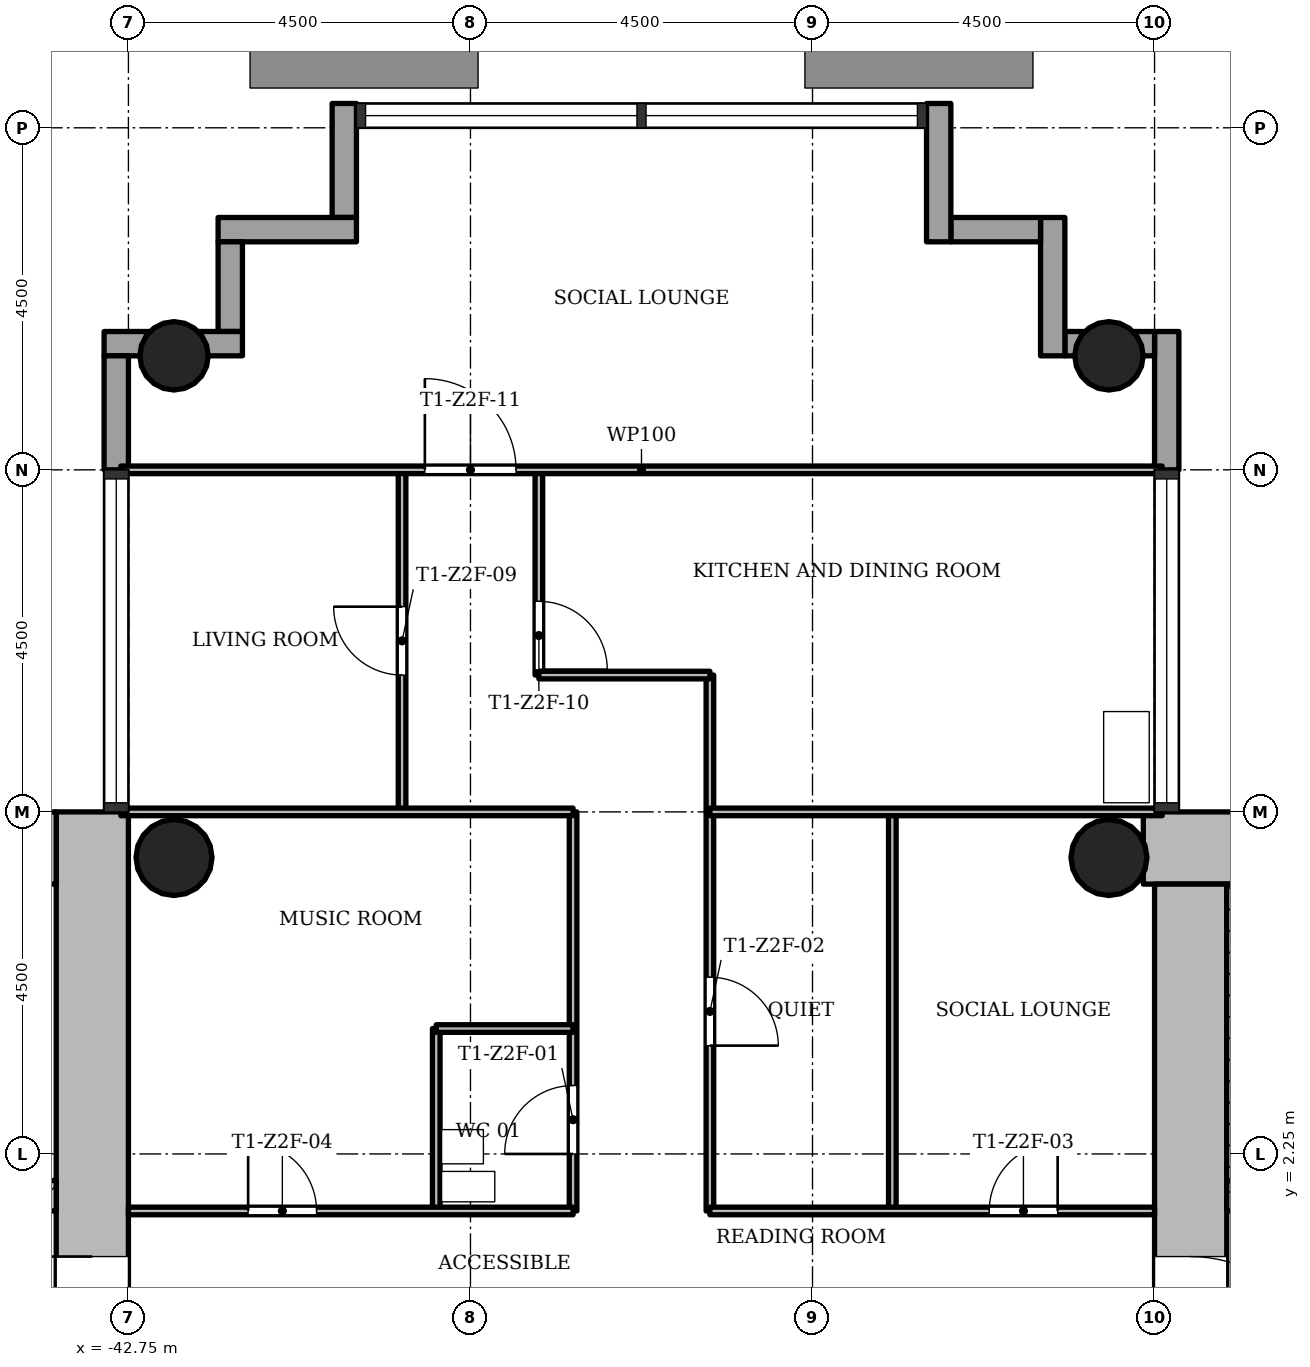
"""IFC4 building model, lengths in metres.
Left out: names, types, materials, properties, quantities, classifications, styles, units other than length and angle.
Written with IfcOpenShell. Run it as: python <this file> out.ifc"""

import sys

from ifc_helpers import new_model, si_unit, direction, frame, frame_2d, origin, origin_2d, place, context, subcontext, project, spatial, rectangle, hollow_circle, extrude, element, fill, save


model = new_model("IFC4")
c1 = context("Model", 3, precision=1e-05, world=origin(), true_north=direction((0.0, 1.0)))
c2 = subcontext(c1, "Body", "Model", "MODEL_VIEW")
j1 = project(units=[si_unit("LENGTHUNIT", "METRE"), si_unit("PLANEANGLEUNIT", "RADIAN")], contexts=[c1])
p1 = place(None, origin())
s1 = spatial("IfcSite", under=j1, at=p1, CompositionType="ELEMENT")
p2 = place(p1, origin())
s2 = spatial("IfcBuilding", under=s1, at=p2, CompositionType="ELEMENT")
p3 = place(p2, frame((0.0, 0.0, 107.2)))
s3 = spatial("IfcBuildingStorey", under=s2, at=p3, CompositionType="ELEMENT", Elevation=107.2)
p4 = place(p3, frame((-20.702, 6.275, 0.0), z_axis=(0.0, 0.0, 1.0), x_axis=(-1.0, 0.0, 0.0)))
e1 = element("IfcWall", 1, at=p4, inside=s3, PredefinedType="SHEAR", context=c2, shape_type="SweptSolid", body=[
    extrude(rectangle(XDim=8.696, YDim=0.95, at=frame_2d((4.348, 0.0))), origin(), (0.0, 0.0, 1.0), 3.4),
])
p5 = place(p3, frame((-28.775, 5.8, 0.0), z_axis=(0.0, 0.0, 1.0), x_axis=(0.0, -1.0, 0.0)))
e2 = element("IfcWall", 2, at=p5, inside=s3, PredefinedType="SHEAR", context=c2, shape_type="SweptSolid", body=[
    extrude(rectangle(XDim=12.55, YDim=0.95, at=frame_2d((6.275, 0.0))), origin(), (0.0, 0.0, 1.0), 3.4),
])
p6 = place(p5, frame((4.9, 0.0, 0.0)))
e3 = element("IfcOpeningElement", 3, at=p6, cuts=e2, PredefinedType="OPENING", context=c2, shape_type="SweptSolid", body=[
    extrude(rectangle(XDim=1.8, YDim=2.1, at=frame_2d((0.9, 1.05))), frame((0.0, 0.485, 0.0), z_axis=(0.0, -1.0, 0.0), x_axis=(1.0, 0.0, 0.0)), (0.0, 0.0, 1.0), 0.97),
])
p7 = place(p3, frame((-28.3, 1.7, 0.0), z_axis=(0.0, 0.0, 1.0), x_axis=(1.0, 0.0, 0.0)))
e4 = element("IfcWall", 4, at=p7, inside=s3, PredefinedType="SHEAR", context=c2, shape_type="SweptSolid", body=[
    extrude(rectangle(XDim=7.1, YDim=0.4, at=frame_2d((3.55, 0.0))), origin(), (0.0, 0.0, 1.0), 3.4),
])
p8 = place(p7, frame((0.7, 0.0, 0.0)))
e5 = element("IfcOpeningElement", 5, at=p8, cuts=e4, PredefinedType="OPENING", context=c2, shape_type="SweptSolid", body=[
    extrude(rectangle(XDim=0.9, YDim=2.1, at=frame_2d((0.45, 1.05))), frame((0.0, 0.21, 0.0), z_axis=(0.0, -1.0, 0.0), x_axis=(1.0, 0.0, 0.0)), (0.0, 0.0, 1.0), 0.42),
])
p9 = place(p3, frame((-43.225, -5.8, 0.0), z_axis=(0.0, 0.0, 1.0), x_axis=(0.0, 1.0, 0.0)))
e6 = element("IfcWall", 6, at=p9, inside=s3, PredefinedType="SHEAR", context=c2, shape_type="SweptSolid", body=[
    extrude(rectangle(XDim=12.55, YDim=0.95, at=frame_2d((6.275, 0.0))), origin(), (0.0, 0.0, 1.0), 3.4),
])
p10 = place(p9, frame((4.9, 0.0, 0.0)))
e7 = element("IfcOpeningElement", 7, at=p10, cuts=e6, PredefinedType="OPENING", context=c2, shape_type="SweptSolid", body=[
    extrude(rectangle(XDim=1.8, YDim=2.1, at=frame_2d((0.9, 1.05))), frame((0.0, 0.485, 0.0), z_axis=(0.0, -1.0, 0.0), x_axis=(1.0, 0.0, 0.0)), (0.0, 0.0, 1.0), 0.97),
])
p11 = place(p3, frame((-43.7, 6.275, 0.0), z_axis=(0.0, 0.0, 1.0), x_axis=(-1.0, 0.0, 0.0)))
e8 = element("IfcWall", 8, at=p11, inside=s3, PredefinedType="SHEAR", context=c2, shape_type="SweptSolid", body=[
    extrude(rectangle(XDim=8.05, YDim=0.95, at=frame_2d((4.025, 0.0))), origin(), (0.0, 0.0, 1.0), 3.4),
])
p12 = place(p3, frame((-50.8, 1.7, 0.0), z_axis=(0.0, 0.0, 1.0), x_axis=(1.0, 0.0, 0.0)))
e9 = element("IfcWall", 9, at=p12, inside=s3, PredefinedType="SHEAR", context=c2, shape_type="SweptSolid", body=[
    extrude(rectangle(XDim=7.1, YDim=0.4, at=frame_2d((3.55, 0.0))), origin(), (0.0, 0.0, 1.0), 3.4),
])
p13 = place(p12, frame((5.2, 0.0, 0.0)))
e10 = element("IfcOpeningElement", 10, at=p13, cuts=e9, PredefinedType="OPENING", context=c2, shape_type="SweptSolid", body=[
    extrude(rectangle(XDim=1.1, YDim=2.1, at=frame_2d((0.55, 1.05))), frame((0.0, 0.21, 0.0), z_axis=(0.0, -1.0, 0.0), x_axis=(1.0, 0.0, 0.0)), (0.0, 0.0, 1.0), 0.42),
])
for number, where, z_axis, x_axis in (
    (11, (-29.85, 12.75, 0.0), (0.0, 0.0, 1.0), (1.0, 0.0, 0.0)),
    (12, (-42.15, 12.75, 0.0), (0.0, 0.0, 1.0), (1.0, 0.0, 0.0)),
):
    element("IfcColumn", number, at=place(p3, frame(where, z_axis=z_axis, x_axis=x_axis)), inside=s3, PredefinedType="COLUMN", context=c2, shape_type="SweptSolid", body=[
        extrude(hollow_circle(Radius=0.45, WallThickness=0.032, at=origin_2d()), origin(), (0.0, 0.0, 1.0), 3.4),
    ])
for number, where, z_axis, x_axis in (
    (13, (-29.85, 6.15, 0.0), (0.0, 0.0, 1.0), (1.0, 0.0, 0.0)),
    (14, (-42.15, 6.15, 0.0), (0.0, 0.0, 1.0), (1.0, 0.0, 0.0)),
):
    element("IfcColumn", number, at=place(p3, frame(where, z_axis=z_axis, x_axis=x_axis)), inside=s3, PredefinedType="COLUMN", context=c2, shape_type="SweptSolid", body=[
        extrude(hollow_circle(Radius=0.5, WallThickness=0.036, at=origin_2d()), origin(), (0.0, 0.0, 1.0), 3.4),
    ])
p14 = place(p3, frame((-29.09, 11.25, -0.3), z_axis=(0.0, 0.0, 1.0), x_axis=(0.0, 1.0, 0.0)))
e15 = element("IfcWall", 15, at=p14, inside=s3, PredefinedType="STANDARD", context=c2, shape_type="SweptSolid", body=[
    extrude(rectangle(XDim=1.82, YDim=0.32, at=frame_2d((0.91, 0.0))), origin(), (0.0, 0.0, 1.0), 3.4),
])
p15 = place(p3, frame((-29.25, 12.91, -0.3), z_axis=(0.0, 0.0, 1.0), x_axis=(-1.0, 0.0, 0.0)))
e16 = element("IfcWall", 16, at=p15, inside=s3, PredefinedType="STANDARD", context=c2, shape_type="SweptSolid", body=[
    extrude(rectangle(XDim=1.18, YDim=0.32, at=frame_2d((0.59, 0.0))), origin(), (0.0, 0.0, 1.0), 3.4),
])
p16 = place(p3, frame((-30.59, 12.75, -0.3), z_axis=(0.0, 0.0, 1.0), x_axis=(0.0, 1.0, 0.0)))
e17 = element("IfcWall", 17, at=p16, inside=s3, PredefinedType="STANDARD", context=c2, shape_type="SweptSolid", body=[
    extrude(rectangle(XDim=1.82, YDim=0.32, at=frame_2d((0.91, 0.0))), origin(), (0.0, 0.0, 1.0), 3.4),
])
p17 = place(p3, frame((-30.75, 14.41, -0.3), z_axis=(0.0, 0.0, 1.0), x_axis=(-1.0, 0.0, 0.0)))
e18 = element("IfcWall", 18, at=p17, inside=s3, PredefinedType="STANDARD", context=c2, shape_type="SweptSolid", body=[
    extrude(rectangle(XDim=1.18, YDim=0.32, at=frame_2d((0.59, 0.0))), origin(), (0.0, 0.0, 1.0), 3.4),
])
p18 = place(p3, frame((-32.09, 14.25, -0.3), z_axis=(0.0, 0.0, 1.0), x_axis=(0.0, 1.0, 0.0)))
e19 = element("IfcWall", 19, at=p18, inside=s3, PredefinedType="STANDARD", context=c2, shape_type="SweptSolid", body=[
    extrude(rectangle(XDim=1.82, YDim=0.32, at=frame_2d((0.91, 0.0))), origin(), (0.0, 0.0, 1.0), 3.4),
])
p19 = place(p3, frame((-39.91, 16.07, -0.3), z_axis=(0.0, 0.0, 1.0), x_axis=(0.0, -1.0, 0.0)))
e20 = element("IfcWall", 20, at=p19, inside=s3, PredefinedType="STANDARD", context=c2, shape_type="SweptSolid", body=[
    extrude(rectangle(XDim=1.5, YDim=0.32, at=frame_2d((0.75, 0.0))), origin(), (0.0, 0.0, 1.0), 3.4),
])
p20 = place(p3, frame((-39.75, 14.41, -0.3), z_axis=(0.0, 0.0, 1.0), x_axis=(-1.0, 0.0, 0.0)))
e21 = element("IfcWall", 21, at=p20, inside=s3, PredefinedType="STANDARD", context=c2, shape_type="SweptSolid", body=[
    extrude(rectangle(XDim=1.82, YDim=0.32, at=frame_2d((0.91, 0.0))), origin(), (0.0, 0.0, 1.0), 3.4),
])
p21 = place(p3, frame((-41.41, 14.25, -0.3), z_axis=(0.0, 0.0, 1.0), x_axis=(0.0, -1.0, 0.0)))
e22 = element("IfcWall", 22, at=p21, inside=s3, PredefinedType="STANDARD", context=c2, shape_type="SweptSolid", body=[
    extrude(rectangle(XDim=1.18, YDim=0.32, at=frame_2d((0.59, 0.0))), origin(), (0.0, 0.0, 1.0), 3.4),
])
p22 = place(p3, frame((-41.25, 12.91, -0.3), z_axis=(0.0, 0.0, 1.0), x_axis=(-1.0, 0.0, 0.0)))
e23 = element("IfcWall", 23, at=p22, inside=s3, PredefinedType="STANDARD", context=c2, shape_type="SweptSolid", body=[
    extrude(rectangle(XDim=1.82, YDim=0.32, at=frame_2d((0.91, 0.0))), origin(), (0.0, 0.0, 1.0), 3.4),
])
p23 = place(p3, frame((-42.91, 12.75, -0.3), z_axis=(0.0, 0.0, 1.0), x_axis=(0.0, -1.0, 0.0)))
e24 = element("IfcWall", 24, at=p23, inside=s3, PredefinedType="STANDARD", context=c2, shape_type="SweptSolid", body=[
    extrude(rectangle(XDim=1.5, YDim=0.32, at=frame_2d((0.75, 0.0))), origin(), (0.0, 0.0, 1.0), 3.4),
])
p24 = place(p3, frame((-39.15, 6.75, 0.0), z_axis=(0.0, 0.0, 1.0), x_axis=(0.0, 1.0, 0.0)))
e25 = element("IfcWall", 25, at=p24, inside=s3, PredefinedType="PARTITIONING", context=c2, shape_type="SweptSolid", body=[
    extrude(rectangle(XDim=4.5, YDim=0.1, at=frame_2d((2.25, 0.0))), origin(), (0.0, 0.0, 1.0), 3.0),
])
p25 = place(p24, frame((1.8, 0.0, 0.0)))
e26 = element("IfcOpeningElement", 26, at=p25, cuts=e25, PredefinedType="OPENING", context=c2, shape_type="SweptSolid", body=[
    extrude(rectangle(XDim=0.9, YDim=2.1, at=frame_2d((0.45, 1.05))), frame((0.0, 0.06, 0.0), z_axis=(0.0, -1.0, 0.0), x_axis=(1.0, 0.0, 0.0)), (0.0, 0.0, 1.0), 0.12),
])
p26 = place(p3, frame((-38.7, 1.5, 0.0), z_axis=(0.0, 0.0, 1.0), x_axis=(0.0, 1.0, 0.0)))
e27 = element("IfcWall", 27, at=p26, inside=s3, PredefinedType="PARTITIONING", context=c2, shape_type="SweptSolid", body=[
    extrude(rectangle(XDim=2.4, YDim=0.1, at=frame_2d((1.2, 0.0))), origin(), (0.0, 0.0, 1.0), 3.0),
])
p27 = place(p3, frame((-37.35, 8.55, 0.0), z_axis=(0.0, 0.0, 1.0), x_axis=(0.0, 1.0, 0.0)))
e28 = element("IfcWall", 28, at=p27, inside=s3, PredefinedType="PARTITIONING", context=c2, shape_type="SweptSolid", body=[
    extrude(rectangle(XDim=2.7, YDim=0.1, at=frame_2d((1.35, 0.0))), origin(), (0.0, 0.0, 1.0), 3.0),
])
p28 = place(p27, frame((0.07, 0.0, 0.0)))
e29 = element("IfcOpeningElement", 29, at=p28, cuts=e28, PredefinedType="OPENING", context=c2, shape_type="SweptSolid", body=[
    extrude(rectangle(XDim=0.9, YDim=2.1, at=frame_2d((0.45, 1.05))), frame((0.0, 0.06, 0.0), z_axis=(0.0, -1.0, 0.0), x_axis=(1.0, 0.0, 0.0)), (0.0, 0.0, 1.0), 0.12),
])
p29 = place(p3, frame((-36.9, 1.5, 0.0), z_axis=(0.0, 0.0, 1.0), x_axis=(0.0, 1.0, 0.0)))
e30 = element("IfcWall", 30, at=p29, inside=s3, PredefinedType="PARTITIONING", context=c2, shape_type="SweptSolid", body=[
    extrude(rectangle(XDim=5.25, YDim=0.1, at=frame_2d((2.625, 0.0))), origin(), (0.0, 0.0, 1.0), 3.0),
])
p30 = place(p29, frame((0.75, 0.0, 0.0)))
e31 = element("IfcOpeningElement", 31, at=p30, cuts=e30, PredefinedType="OPENING", context=c2, shape_type="SweptSolid", body=[
    extrude(rectangle(XDim=0.9, YDim=2.1, at=frame_2d((0.45, 1.05))), frame((0.0, 0.06, 0.0), z_axis=(0.0, -1.0, 0.0), x_axis=(1.0, 0.0, 0.0)), (0.0, 0.0, 1.0), 0.12),
])
p31 = place(p3, frame((-35.1, 1.5, 0.0), z_axis=(0.0, 0.0, 1.0), x_axis=(0.0, 1.0, 0.0)))
e32 = element("IfcWall", 32, at=p31, inside=s3, PredefinedType="PARTITIONING", context=c2, shape_type="SweptSolid", body=[
    extrude(rectangle(XDim=7.05, YDim=0.1, at=frame_2d((3.525, 0.0))), origin(), (0.0, 0.0, 1.0), 3.0),
])
p32 = place(p31, frame((2.175, 0.0, 0.0)))
e33 = element("IfcOpeningElement", 33, at=p32, cuts=e32, PredefinedType="OPENING", context=c2, shape_type="SweptSolid", body=[
    extrude(rectangle(XDim=0.9, YDim=2.1, at=frame_2d((0.45, 1.05))), frame((0.0, 0.06, 0.0), z_axis=(0.0, -1.0, 0.0), x_axis=(1.0, 0.0, 0.0)), (0.0, 0.0, 1.0), 0.12),
])
p33 = place(p3, frame((-32.7, 1.5, 0.0), z_axis=(0.0, 0.0, 1.0), x_axis=(0.0, 1.0, 0.0)))
e34 = element("IfcWall", 34, at=p33, inside=s3, PredefinedType="PARTITIONING", context=c2, shape_type="SweptSolid", body=[
    extrude(rectangle(XDim=5.25, YDim=0.1, at=frame_2d((2.625, 0.0))), origin(), (0.0, 0.0, 1.0), 3.0),
])
p34 = place(p3, frame((-42.75, 1.5, 0.0), z_axis=(0.0, 0.0, 1.0), x_axis=(1.0, 0.0, 0.0)))
e35 = element("IfcWall", 35, at=p34, inside=s3, PredefinedType="PARTITIONING", context=c2, shape_type="SweptSolid", body=[
    extrude(rectangle(XDim=5.85, YDim=0.1, at=frame_2d((2.925, 0.0))), origin(), (0.0, 0.0, 1.0), 3.0),
])
p35 = place(p34, frame((1.575, 0.0, 0.0)))
e36 = element("IfcOpeningElement", 36, at=p35, cuts=e35, PredefinedType="OPENING", context=c2, shape_type="SweptSolid", body=[
    extrude(rectangle(XDim=0.9, YDim=2.1, at=frame_2d((0.45, 1.05))), frame((0.0, 0.06, 0.0), z_axis=(0.0, -1.0, 0.0), x_axis=(1.0, 0.0, 0.0)), (0.0, 0.0, 1.0), 0.12),
])
p36 = place(p3, frame((-35.1, 1.5, 0.0), z_axis=(0.0, 0.0, 1.0), x_axis=(1.0, 0.0, 0.0)))
e37 = element("IfcWall", 37, at=p36, inside=s3, PredefinedType="PARTITIONING", context=c2, shape_type="SweptSolid", body=[
    extrude(rectangle(XDim=5.85, YDim=0.1, at=frame_2d((2.925, 0.0))), origin(), (0.0, 0.0, 1.0), 3.0),
])
p37 = place(p36, frame((3.675, 0.0, 0.0)))
e38 = element("IfcOpeningElement", 38, at=p37, cuts=e37, PredefinedType="OPENING", context=c2, shape_type="SweptSolid", body=[
    extrude(rectangle(XDim=0.9, YDim=2.1, at=frame_2d((0.45, 1.05))), frame((0.0, 0.06, 0.0), z_axis=(0.0, -1.0, 0.0), x_axis=(1.0, 0.0, 0.0)), (0.0, 0.0, 1.0), 0.12),
])
p38 = place(p3, frame((-38.7, 3.9, 0.0), z_axis=(0.0, 0.0, 1.0), x_axis=(1.0, 0.0, 0.0)))
e39 = element("IfcWall", 39, at=p38, inside=s3, PredefinedType="PARTITIONING", context=c2, shape_type="SweptSolid", body=[
    extrude(rectangle(XDim=1.8, YDim=0.1, at=frame_2d((0.9, 0.0))), origin(), (0.0, 0.0, 1.0), 3.0),
])
for number, where, z_axis, x_axis in (
    (40, (-42.85, 6.75, 0.0), (0.0, 0.0, 1.0), (1.0, 0.0, 0.0)),
    (41, (-35.1, 6.75, 0.0), (0.0, 0.0, 1.0), (1.0, 0.0, 0.0)),
):
    element("IfcWall", number, at=place(p3, frame(where, z_axis=z_axis, x_axis=x_axis)), inside=s3, PredefinedType="PARTITIONING", context=c2, shape_type="SweptSolid", body=[
        extrude(rectangle(XDim=5.95, YDim=0.1, at=frame_2d((2.975, 0.0))), origin(), (0.0, 0.0, 1.0), 3.0),
    ])
p39 = place(p3, frame((-37.35, 8.55, 0.0), z_axis=(0.0, 0.0, 1.0), x_axis=(1.0, 0.0, 0.0)))
e42 = element("IfcWall", 42, at=p39, inside=s3, PredefinedType="PARTITIONING", context=c2, shape_type="SweptSolid", body=[
    extrude(rectangle(XDim=2.25, YDim=0.1, at=frame_2d((1.125, 0.0))), origin(), (0.0, 0.0, 1.0), 3.0),
])
p40 = place(p3, frame((-42.85, 11.25, 0.0), z_axis=(0.0, 0.0, 1.0), x_axis=(1.0, 0.0, 0.0)))
e43 = element("IfcWall", 43, at=p40, inside=s3, PredefinedType="PARTITIONING", context=c2, shape_type="SweptSolid", body=[
    extrude(rectangle(XDim=13.7, YDim=0.1, at=frame_2d((6.85, 0.0))), origin(), (0.0, 0.0, 1.0), 3.0),
])
p41 = place(p40, frame((4.0, 0.0, 0.0)))
e44 = element("IfcOpeningElement", 44, at=p41, cuts=e43, PredefinedType="OPENING", context=c2, shape_type="SweptSolid", body=[
    extrude(rectangle(XDim=1.2, YDim=2.1, at=frame_2d((0.6, 1.05))), frame((0.0, 0.06, 0.0), z_axis=(0.0, -1.0, 0.0), x_axis=(1.0, 0.0, 0.0)), (0.0, 0.0, 1.0), 0.12),
])
p42 = place(p3, frame((-28.175, 1.9, 0.0), z_axis=(0.0, 0.0, 1.0), x_axis=(0.0, 1.0, 0.0)))
e45 = element("IfcWall", 45, at=p42, inside=s3, PredefinedType="SHEAR", context=c2, shape_type="SweptSolid", body=[
    extrude(rectangle(XDim=3.9, YDim=0.25, at=frame_2d((1.95, 0.0))), origin(), (0.0, 0.0, 1.0), 3.4),
])
p43 = place(p30, origin())
e46 = element("IfcDoor", 46, at=p43, inside=s3, OperationType="SINGLE_SWING_RIGHT", PredefinedType="DOOR", context=c2, shape_type="SweptSolid", body=[
    extrude(rectangle(XDim=0.9, YDim=2.1, at=frame_2d((0.45, 1.05))), frame((0.0, 0.025, 0.0), z_axis=(0.0, -1.0, 0.0), x_axis=(1.0, 0.0, 0.0)), (0.0, 0.0, 1.0), 0.05),
])
fill(e31, e46)
p44 = place(p32, origin())
e47 = element("IfcDoor", 47, at=p44, inside=s3, OperationType="SINGLE_SWING_LEFT", PredefinedType="DOOR", context=c2, shape_type="SweptSolid", body=[
    extrude(rectangle(XDim=0.9, YDim=2.1, at=frame_2d((0.45, 1.05))), frame((0.0, 0.025, 0.0), z_axis=(0.0, -1.0, 0.0), x_axis=(1.0, 0.0, 0.0)), (0.0, 0.0, 1.0), 0.05),
])
fill(e33, e47)
p45 = place(p37, origin())
e48 = element("IfcDoor", 48, at=p45, inside=s3, OperationType="SINGLE_SWING_LEFT", PredefinedType="DOOR", context=c2, shape_type="SweptSolid", body=[
    extrude(rectangle(XDim=0.9, YDim=2.1, at=frame_2d((0.45, 1.05))), frame((0.0, 0.025, 0.0), z_axis=(0.0, -1.0, 0.0), x_axis=(1.0, 0.0, 0.0)), (0.0, 0.0, 1.0), 0.05),
])
fill(e38, e48)
p46 = place(p35, origin())
e49 = element("IfcDoor", 49, at=p46, inside=s3, OperationType="SINGLE_SWING_RIGHT", PredefinedType="DOOR", context=c2, shape_type="SweptSolid", body=[
    extrude(rectangle(XDim=0.9, YDim=2.1, at=frame_2d((0.45, 1.05))), frame((0.0, 0.025, 0.0), z_axis=(0.0, -1.0, 0.0), x_axis=(1.0, 0.0, 0.0)), (0.0, 0.0, 1.0), 0.05),
])
fill(e36, e49)
p47 = place(p25, origin())
e50 = element("IfcDoor", 50, at=p47, inside=s3, OperationType="SINGLE_SWING_LEFT", PredefinedType="DOOR", context=c2, shape_type="SweptSolid", body=[
    extrude(rectangle(XDim=0.9, YDim=2.1, at=frame_2d((0.45, 1.05))), frame((0.0, 0.025, 0.0), z_axis=(0.0, -1.0, 0.0), x_axis=(1.0, 0.0, 0.0)), (0.0, 0.0, 1.0), 0.05),
])
fill(e26, e50)
p48 = place(p28, origin())
e51 = element("IfcDoor", 51, at=p48, inside=s3, OperationType="SINGLE_SWING_LEFT", PredefinedType="DOOR", context=c2, shape_type="SweptSolid", body=[
    extrude(rectangle(XDim=0.9, YDim=2.1, at=frame_2d((0.45, 1.05))), frame((0.0, 0.025, 0.0), z_axis=(0.0, -1.0, 0.0), x_axis=(1.0, 0.0, 0.0)), (0.0, 0.0, 1.0), 0.05),
])
fill(e29, e51)
p49 = place(p41, origin())
e52 = element("IfcDoor", 52, at=p49, inside=s3, OperationType="SINGLE_SWING_RIGHT", PredefinedType="DOOR", context=c2, shape_type="SweptSolid", body=[
    extrude(rectangle(XDim=1.2, YDim=2.1, at=frame_2d((0.6, 1.05))), frame((0.0, 0.025, 0.0), z_axis=(0.0, -1.0, 0.0), x_axis=(1.0, 0.0, 0.0)), (0.0, 0.0, 1.0), 0.05),
])
fill(e44, e52)
p50 = place(p6, origin())
e53 = element("IfcDoor", 53, at=p50, inside=s3, OperationType="SINGLE_SWING_LEFT", PredefinedType="DOOR", context=c2, shape_type="SweptSolid", body=[
    extrude(rectangle(XDim=1.8, YDim=2.1, at=frame_2d((0.9, 1.05))), frame((0.0, 0.025, 0.0), z_axis=(0.0, -1.0, 0.0), x_axis=(1.0, 0.0, 0.0)), (0.0, 0.0, 1.0), 0.05),
])
fill(e3, e53)
p51 = place(p10, origin())
e54 = element("IfcDoor", 54, at=p51, inside=s3, OperationType="SINGLE_SWING_LEFT", PredefinedType="DOOR", context=c2, shape_type="SweptSolid", body=[
    extrude(rectangle(XDim=1.8, YDim=2.1, at=frame_2d((0.9, 1.05))), frame((0.0, 0.025, 0.0), z_axis=(0.0, -1.0, 0.0), x_axis=(1.0, 0.0, 0.0)), (0.0, 0.0, 1.0), 0.05),
])
fill(e7, e54)
save(model, sys.argv[1])
